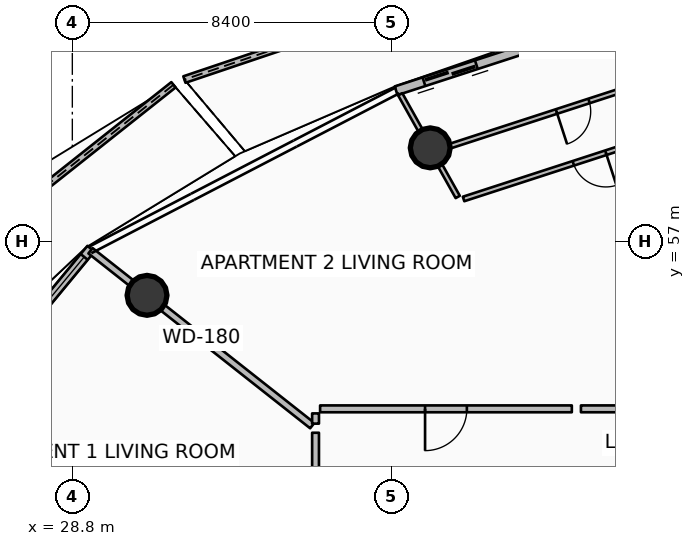
"""IFC4 building model, lengths in metres.
Left out: names, types, materials, properties, quantities, classifications, styles, units other than length and angle.
Written with IfcOpenShell. Run it as: python <this file> out.ifc"""

import sys

from ifc_helpers import new_model, si_unit, direction, frame, frame_2d, origin, origin_2d, place, context, subcontext, project, spatial, polyline, rectangle, circle, outline, extrude, element, fill, save


model = new_model("IFC4")
c1 = context("Model", 3, precision=1e-05, world=origin(), true_north=direction((0.0, 1.0)))
c2 = subcontext(c1, "Body", "Model", "MODEL_VIEW")
j1 = project(units=[si_unit("LENGTHUNIT", "METRE"), si_unit("PLANEANGLEUNIT", "RADIAN")], contexts=[c1])
p1 = place(None, origin())
s1 = spatial("IfcSite", under=j1, at=p1, CompositionType="ELEMENT")
p2 = place(p1, origin())
s2 = spatial("IfcBuilding", under=s1, at=p2, CompositionType="ELEMENT")
p3 = place(p2, frame((0.0, 0.0, 142.8)))
s3 = spatial("IfcBuildingStorey", under=s2, at=p3, CompositionType="ELEMENT", Elevation=142.8)
for number, where, z_axis, x_axis in (
    (1, (38.218, 59.467, 0.0), (0.0, 0.0, 1.0), (1.0, 0.0, 0.0)),
    (2, (30.766, 55.586, 0.0), (0.0, 0.0, 1.0), (1.0, 0.0, 0.0)),
):
    element("IfcColumn", number, at=place(p3, frame(where, z_axis=z_axis, x_axis=x_axis)), inside=s3, PredefinedType="COLUMN", context=c2, shape_type="SweptSolid", body=[
        extrude(circle(Radius=0.525, at=origin_2d()), origin(), (0.0, 0.0, 1.0), 3.5),
    ])
p4 = place(p3, frame((40.64, 64.263, 0.0), z_axis=(0.0, 0.0, 1.0), x_axis=(-0.947571676397, -0.319543296113, 0.0)))
e3 = element("IfcWall", 3, at=p4, inside=s3, PredefinedType="PARAPET", context=c2, shape_type="SweptSolid", body=[
    extrude(outline(polyline([(0.0, 0.0), (9.383, 0.0), (9.383, 1.747), (4.691, 1.562), (0.0, 1.348), (0.0, 0.0)])), frame((0.0, 0.09, 0.0), z_axis=(0.0, -1.0, 0.0), x_axis=(1.0, 0.0, 0.0)), (0.0, 0.0, 1.0), 0.18),
])
p5 = place(p3, frame((31.461, 61.126, 0.0), z_axis=(0.0, 0.0, 1.0), x_axis=(-0.783643972098, -0.621210209989, 0.0)))
e4 = element("IfcWall", 4, at=p5, inside=s3, PredefinedType="PARAPET", context=c2, shape_type="SweptSolid", body=[
    extrude(outline(polyline([(0.0, 0.0), (10.365, 0.0), (10.365, 1.832), (5.182, 1.853), (0.0, 1.756), (0.0, 0.0)])), frame((0.0, 0.09, 0.0), z_axis=(0.0, -1.0, 0.0), x_axis=(1.0, 0.0, 0.0)), (0.0, 0.0, 1.0), 0.18),
])
p6 = place(p3, frame((45.49, 63.624, 0.0), z_axis=(0.0, 0.0, 1.0), x_axis=(-0.951046390632, -0.309048156224, 0.0)))
e5 = element("IfcWall", 5, at=p6, inside=s3, PredefinedType="SOLIDWALL", context=c2, shape_type="SweptSolid", body=[
    extrude(rectangle(XDim=8.59, YDim=0.24, at=frame_2d((4.295, 0.0))), origin(), (0.0, 0.0, 1.0), 2.45),
])
p7 = place(p6, frame((6.37, 0.0, 0.0)))
e6 = element("IfcOpeningElement", 6, at=p7, cuts=e5, PredefinedType="OPENING", context=c2, shape_type="SweptSolid", body=[
    extrude(rectangle(XDim=1.45, YDim=2.15, at=frame_2d((0.725, 1.075))), frame((0.0, 0.13, 0.0), z_axis=(0.0, -1.0, 0.0), x_axis=(1.0, 0.0, 0.0)), (0.0, 0.0, 1.0), 0.26),
])
p8 = place(p6, frame((0.28, 0.0, 0.65)))
e7 = element("IfcOpeningElement", 7, at=p8, cuts=e5, PredefinedType="OPENING", context=c2, shape_type="SweptSolid", body=[
    extrude(rectangle(XDim=1.6, YDim=1.5, at=frame_2d((0.8, 0.75))), frame((0.0, 0.13, 0.0), z_axis=(0.0, -1.0, 0.0), x_axis=(1.0, 0.0, 0.0)), (0.0, 0.0, 1.0), 0.26),
])
p9 = place(p3, frame((29.291, 56.813, 0.0), z_axis=(0.0, 0.0, 1.0), x_axis=(-0.636771922292, -0.77105221547, 0.0)))
e8 = element("IfcWall", 8, at=p9, inside=s3, PredefinedType="SOLIDWALL", context=c2, shape_type="SweptSolid", body=[
    extrude(rectangle(XDim=10.082, YDim=0.24, at=frame_2d((5.041, 0.0))), origin(), (0.0, 0.0, 1.0), 2.45),
])
p10 = place(p9, frame((7.862, 0.0, 0.0)))
e9 = element("IfcOpeningElement", 9, at=p10, cuts=e8, PredefinedType="OPENING", context=c2, shape_type="SweptSolid", body=[
    extrude(rectangle(XDim=1.45, YDim=2.15, at=frame_2d((0.725, 1.075))), frame((0.0, 0.13, 0.0), z_axis=(0.0, -1.0, 0.0), x_axis=(1.0, 0.0, 0.0)), (0.0, 0.0, 1.0), 0.26),
])
p11 = place(p9, frame((0.28, 0.0, 0.65)))
e10 = element("IfcOpeningElement", 10, at=p11, cuts=e8, PredefinedType="OPENING", context=c2, shape_type="SweptSolid", body=[
    extrude(rectangle(XDim=1.6, YDim=1.5, at=frame_2d((0.8, 0.75))), frame((0.0, 0.13, 0.0), z_axis=(0.0, -1.0, 0.0), x_axis=(1.0, 0.0, 0.0)), (0.0, 0.0, 1.0), 0.26),
])
p12 = place(p3, frame((35.114, 52.159, 0.0), z_axis=(0.0, 0.0, 1.0), x_axis=(-0.78531739611, 0.619093359169, 0.0)))
e11 = element("IfcWall", 11, at=p12, inside=s3, PredefinedType="PARTITIONING", context=c2, shape_type="SweptSolid", body=[
    extrude(rectangle(XDim=7.43, YDim=0.18, at=frame_2d((3.715, 0.0))), origin(), (0.0, 0.0, 1.0), 2.94),
])
p13 = place(p3, frame((35.2, 51.971, 0.0), z_axis=(0.0, 0.0, 1.0), x_axis=(0.0, -1.0, 0.0)))
e12 = element("IfcWall", 12, at=p13, inside=s3, PredefinedType="PARTITIONING", context=c2, shape_type="SweptSolid", body=[
    extrude(rectangle(XDim=6.241, YDim=0.18, at=frame_2d((3.12, 0.0))), origin(), (0.0, 0.0, 1.0), 2.94),
])
p14 = place(p13, frame((2.57, 0.0, 0.0)))
e13 = element("IfcOpeningElement", 13, at=p14, cuts=e12, PredefinedType="OPENING", context=c2, shape_type="SweptSolid", body=[
    extrude(rectangle(XDim=1.1, YDim=2.1, at=frame_2d((0.55, 1.05))), frame((0.0, 0.1, 0.0), z_axis=(0.0, -1.0, 0.0), x_axis=(1.0, 0.0, 0.0)), (0.0, 0.0, 1.0), 0.2),
])
p15 = place(p3, frame((41.944, 52.6, 0.0), z_axis=(0.0, 0.0, 1.0), x_axis=(-1.0, 0.0, 0.0)))
e14 = element("IfcWall", 14, at=p15, inside=s3, PredefinedType="PARTITIONING", context=c2, shape_type="SweptSolid", body=[
    extrude(rectangle(XDim=6.624, YDim=0.18, at=frame_2d((3.312, 0.0))), origin(), (0.0, 0.0, 1.0), 2.94),
])
p16 = place(p15, frame((2.762, 0.0, 0.0)))
e15 = element("IfcOpeningElement", 15, at=p16, cuts=e14, PredefinedType="OPENING", context=c2, shape_type="SweptSolid", body=[
    extrude(rectangle(XDim=1.1, YDim=2.1, at=frame_2d((0.55, 1.05))), frame((0.0, 0.1, 0.0), z_axis=(0.0, -1.0, 0.0), x_axis=(1.0, 0.0, 0.0)), (0.0, 0.0, 1.0), 0.2),
])
p17 = place(p3, frame((35.2, 52.48, 0.0), z_axis=(0.0, 0.0, 1.0), x_axis=(0.0, -1.0, 0.0)))
e16 = element("IfcWall", 16, at=p17, inside=s3, PredefinedType="PARTITIONING", context=c2, shape_type="SweptSolid", body=[
    extrude(rectangle(XDim=0.269, YDim=0.18, at=frame_2d((0.135, 0.0))), origin(), (0.0, 0.0, 1.0), 2.94),
])
p18 = place(p3, frame((46.625, 52.6, 0.0), z_axis=(0.0, 0.0, 1.0), x_axis=(-1.0, 0.0, 0.0)))
e17 = element("IfcWall", 17, at=p18, inside=s3, PredefinedType="PARTITIONING", context=c2, shape_type="SweptSolid", body=[
    extrude(rectangle(XDim=4.442, YDim=0.18, at=frame_2d((2.221, 0.0))), origin(), (0.0, 0.0, 1.0), 2.94),
])
p19 = place(p3, frame((38.941, 58.175, 0.0), z_axis=(0.0, 0.0, 1.0), x_axis=(-0.488620181058, 0.872496600946, 0.0)))
e18 = element("IfcWall", 18, at=p19, inside=s3, PredefinedType="PARTITIONING", context=c2, shape_type="SweptSolid", body=[
    extrude(rectangle(XDim=3.095, YDim=0.125, at=frame_2d((1.548, 0.0))), origin(), (0.0, 0.0, 1.0), 2.94),
])
p20 = place(p3, frame((45.728, 60.277, 0.0), z_axis=(0.0, 0.0, 1.0), x_axis=(-0.951064162215, -0.308993461661, 0.0)))
e19 = element("IfcWall", 19, at=p20, inside=s3, PredefinedType="PARTITIONING", context=c2, shape_type="SweptSolid", body=[
    extrude(rectangle(XDim=6.974, YDim=0.125, at=frame_2d((3.487, 0.0))), origin(), (0.0, 0.0, 1.0), 2.94),
])
p21 = place(p20, frame((3.037, 0.0, 0.0)))
e20 = element("IfcOpeningElement", 20, at=p21, cuts=e19, PredefinedType="OPENING", context=c2, shape_type="SweptSolid", body=[
    extrude(rectangle(XDim=0.9, YDim=2.08, at=frame_2d((0.45, 1.04))), frame((0.0, 0.073, 0.0), z_axis=(0.0, -1.0, 0.0), x_axis=(1.0, 0.0, 0.0)), (0.0, 0.0, 1.0), 0.145),
])
p22 = place(p3, frame((45.556, 61.728, 0.0), z_axis=(0.0, 0.0, 1.0), x_axis=(-0.951060224054, -0.309005582834, 0.0)))
e21 = element("IfcWall", 21, at=p22, inside=s3, PredefinedType="PARTITIONING", context=c2, shape_type="SweptSolid", body=[
    extrude(rectangle(XDim=7.544, YDim=0.125, at=frame_2d((3.772, 0.0))), origin(), (0.0, 0.0, 1.0), 2.94),
])
p23 = place(p22, frame((3.322, 0.0, 0.0)))
e22 = element("IfcOpeningElement", 22, at=p23, cuts=e21, PredefinedType="OPENING", context=c2, shape_type="SweptSolid", body=[
    extrude(rectangle(XDim=0.9, YDim=2.08, at=frame_2d((0.45, 1.04))), frame((0.0, 0.073, 0.0), z_axis=(0.0, -1.0, 0.0), x_axis=(1.0, 0.0, 0.0)), (0.0, 0.0, 1.0), 0.145),
])
p24 = place(p7, origin())
e23 = element("IfcDoor", 23, at=p24, inside=s3, OperationType="DOUBLE_DOOR_SLIDING", PredefinedType="DOOR", context=c2, shape_type="SweptSolid", body=[
    extrude(rectangle(XDim=1.45, YDim=2.15, at=frame_2d((0.725, 1.075))), frame((0.0, 0.025, 0.0), z_axis=(0.0, -1.0, 0.0), x_axis=(1.0, 0.0, 0.0)), (0.0, 0.0, 1.0), 0.05),
])
fill(e6, e23)
p25 = place(p11, origin())
e24 = element("IfcWindow", 24, at=p25, inside=s3, PartitioningType="SINGLE_PANEL", PredefinedType="WINDOW", context=c2, shape_type="SweptSolid", body=[
    extrude(rectangle(XDim=1.6, YDim=1.5, at=frame_2d((0.8, 0.75))), frame((0.0, 0.03, 0.0), z_axis=(0.0, -1.0, 0.0), x_axis=(1.0, 0.0, 0.0)), (0.0, 0.0, 1.0), 0.06),
])
fill(e10, e24)
p26 = place(p16, origin())
e25 = element("IfcDoor", 25, at=p26, inside=s3, OperationType="SINGLE_SWING_RIGHT", PredefinedType="DOOR", context=c2, shape_type="SweptSolid", body=[
    extrude(rectangle(XDim=1.1, YDim=2.1, at=frame_2d((0.55, 1.05))), frame((0.0, 0.025, 0.0), z_axis=(0.0, -1.0, 0.0), x_axis=(1.0, 0.0, 0.0)), (0.0, 0.0, 1.0), 0.05),
])
fill(e15, e25)
p27 = place(p21, origin())
e26 = element("IfcDoor", 26, at=p27, inside=s3, OperationType="SINGLE_SWING_LEFT", PredefinedType="DOOR", context=c2, shape_type="SweptSolid", body=[
    extrude(rectangle(XDim=0.9, YDim=2.08, at=frame_2d((0.45, 1.04))), frame((0.0, 0.025, 0.0), z_axis=(0.0, -1.0, 0.0), x_axis=(1.0, 0.0, 0.0)), (0.0, 0.0, 1.0), 0.05),
])
fill(e20, e26)
p28 = place(p23, origin())
e27 = element("IfcDoor", 27, at=p28, inside=s3, OperationType="SINGLE_SWING_RIGHT", PredefinedType="DOOR", context=c2, shape_type="SweptSolid", body=[
    extrude(rectangle(XDim=0.9, YDim=2.08, at=frame_2d((0.45, 1.04))), frame((0.0, 0.025, 0.0), z_axis=(0.0, -1.0, 0.0), x_axis=(1.0, 0.0, 0.0)), (0.0, 0.0, 1.0), 0.05),
])
fill(e22, e27)
save(model, sys.argv[1])
